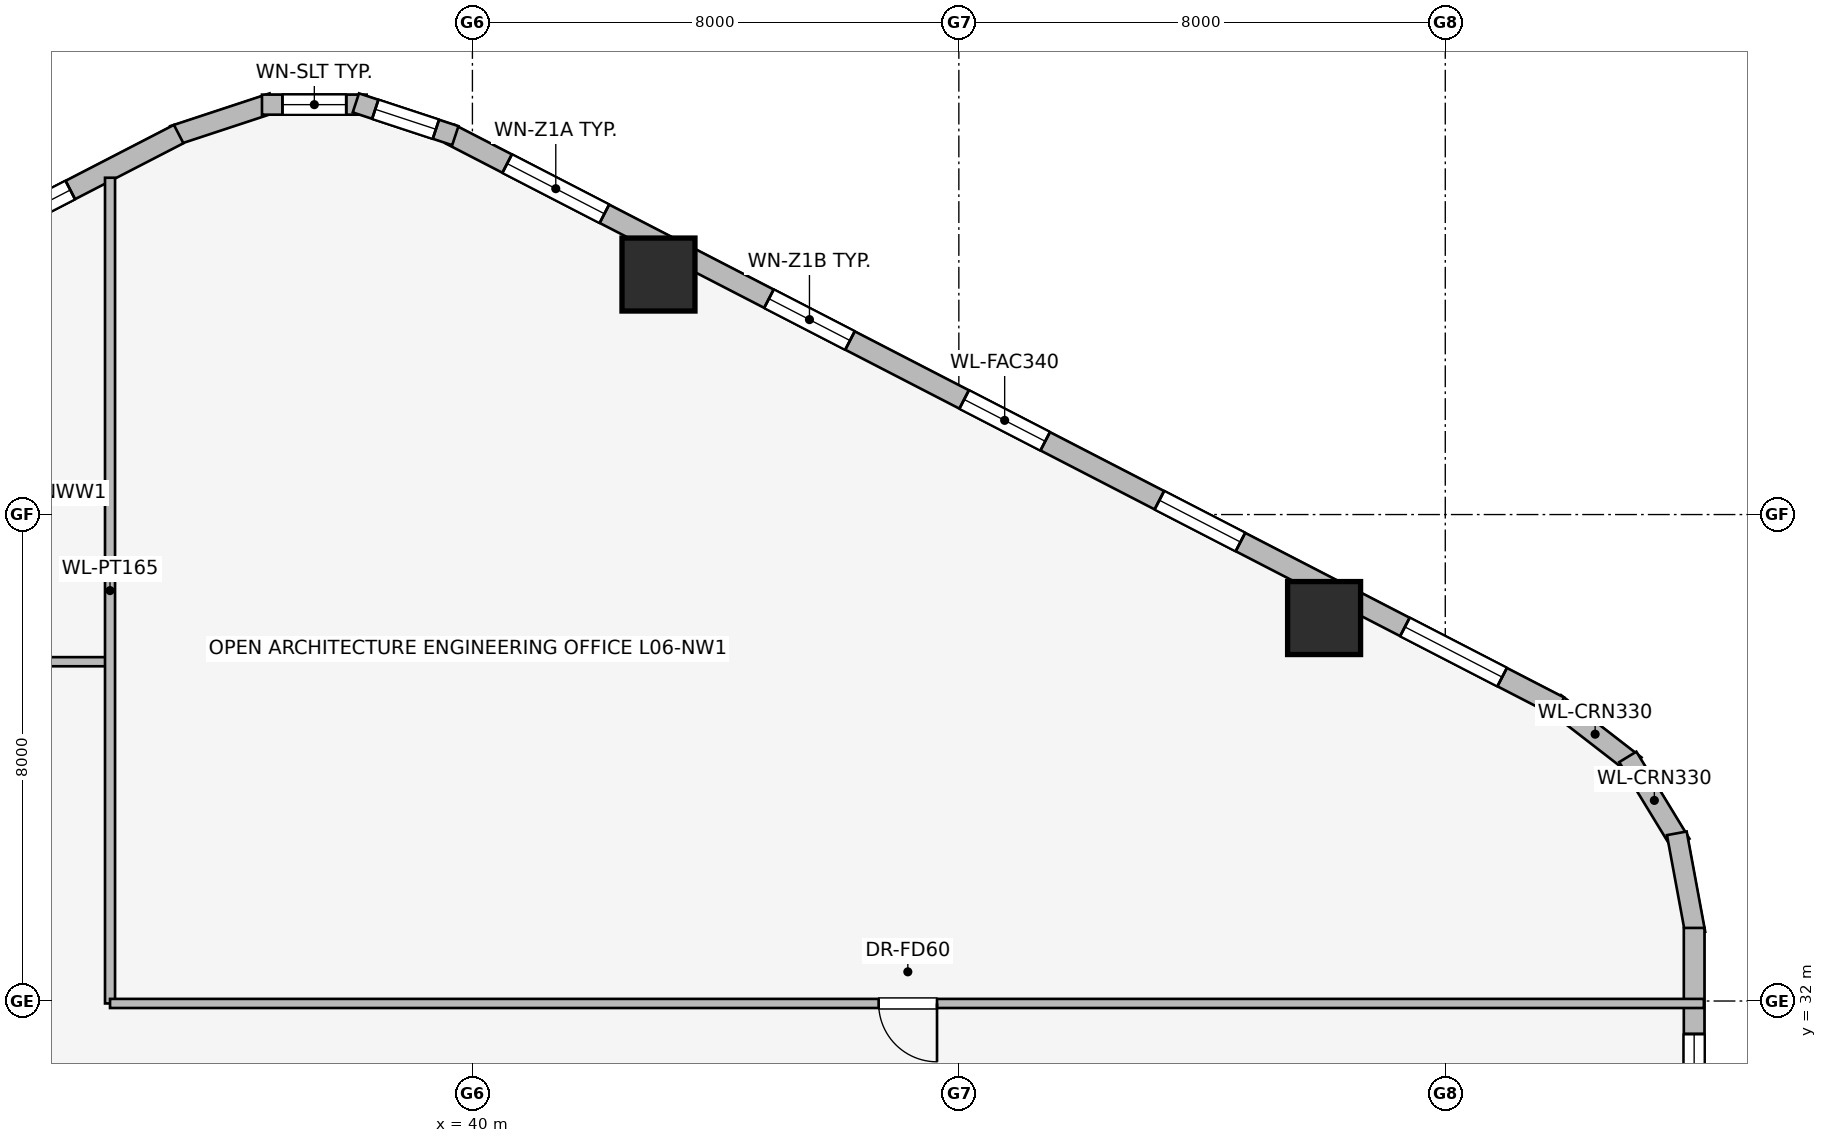
"""IFC4 building model, lengths in metres.
Left out: names, types, materials, properties, quantities, classifications, styles, units other than length and angle.
Written with IfcOpenShell. Run it as: python <this file> out.ifc"""

import sys

from ifc_helpers import new_model, si_unit, direction, frame, frame_2d, origin, origin_2d, place, context, subcontext, project, spatial, rectangle, hollow_rectangle, extrude, element, fill, save


model = new_model("IFC4")
c1 = context("Model", 3, precision=1e-05, world=origin(), true_north=direction((0.0, 1.0)))
c2 = subcontext(c1, "Body", "Model", "MODEL_VIEW")
j1 = project(units=[si_unit("LENGTHUNIT", "METRE"), si_unit("PLANEANGLEUNIT", "RADIAN")], contexts=[c1])
p1 = place(None, origin())
s1 = spatial("IfcSite", under=j1, at=p1, CompositionType="ELEMENT")
p2 = place(p1, origin())
s2 = spatial("IfcBuilding", under=s1, at=p2, CompositionType="ELEMENT")
p3 = place(p2, frame((0.0, 0.0, 21.0)))
s3 = spatial("IfcBuildingStorey", under=s2, at=p3, CompositionType="ELEMENT", Elevation=21.0)
for number, where, z_axis, x_axis in (
    (1, (36.0, 47.1, 5.55), (0.0, 0.0, 1.0), (1.0, 0.0, 0.0)),
    (2, (54.0, 47.1, 5.55), (0.0, 0.0, 1.0), (1.0, 0.0, 0.0)),
):
    element("IfcColumn", number, at=place(p3, frame(where, z_axis=z_axis, x_axis=x_axis)), inside=s3, PredefinedType="USERDEFINED", context=c2, shape_type="SweptSolid", body=[
        extrude(hollow_rectangle(XDim=0.4, YDim=0.4, WallThickness=0.022, at=origin_2d()), origin(), (0.0, 0.0, 1.0), 3.25),
    ])
p4 = place(p2, frame((0.0, 0.0, 27.0)))
s4 = spatial("IfcBuildingStorey", under=s2, at=p4, CompositionType="ELEMENT", Elevation=27.0)
for number, where, z_axis, x_axis in (
    (3, (54.007, 38.298, -0.42), (0.0, 0.0, 1.0), (1.0, 0.0, 0.0)),
    (4, (43.06, 43.947, -0.42), (0.0, 0.0, 1.0), (1.0, 0.0, 0.0)),
):
    element("IfcColumn", number, at=place(p4, frame(where, z_axis=z_axis, x_axis=x_axis)), inside=s4, PredefinedType="COLUMN", context=c2, shape_type="SweptSolid", body=[
        extrude(rectangle(XDim=1.2, YDim=1.2, at=origin_2d()), origin(), (0.0, 0.0, 1.0), 4.07),
    ])
p5 = place(p4, frame((57.802, 36.901, 0.0), z_axis=(0.0, 0.0, 1.0), x_axis=(0.790691856293, -0.61221433207, 0.0)))
e5 = element("IfcWall", 5, at=p5, inside=s4, PredefinedType="STANDARD", context=c2, shape_type="SweptSolid", body=[
    extrude(rectangle(XDim=1.676, YDim=0.33, at=frame_2d((0.838, 0.0))), origin(), (0.0, 0.0, 1.0), 3.39),
])
p6 = place(p4, frame((59.002, 36.015, 0.0), z_axis=(0.0, 0.0, 1.0), x_axis=(0.520584129191, -0.853810379671, 0.0)))
e6 = element("IfcWall", 6, at=p6, inside=s4, PredefinedType="STANDARD", context=c2, shape_type="SweptSolid", body=[
    extrude(rectangle(XDim=1.677, YDim=0.33, at=frame_2d((0.838, 0.0))), origin(), (0.0, 0.0, 1.0), 3.39),
])
p7 = place(p4, frame((59.808, 34.758, 0.0), z_axis=(0.0, 0.0, 1.0), x_axis=(0.181714143354, -0.983351397063, 0.0)))
e7 = element("IfcWall", 7, at=p7, inside=s4, PredefinedType="STANDARD", context=c2, shape_type="SweptSolid", body=[
    extrude(rectangle(XDim=1.678, YDim=0.33, at=frame_2d((0.839, 0.0))), origin(), (0.0, 0.0, 1.0), 3.39),
])
p8 = place(p4, frame((39.631, 46.257, 0.0), z_axis=(0.0, 0.0, 1.0), x_axis=(0.888634413993, -0.458616264721, 0.0)))
e8 = element("IfcWall", 8, at=p8, inside=s4, PredefinedType="STANDARD", context=c2, shape_type="SweptSolid", body=[
    extrude(rectangle(XDim=20.531, YDim=0.34, at=frame_2d((10.266, 0.0))), origin(), (0.0, 0.0, 1.0), 2.684),
])
p9 = place(p8, frame((1.058, 0.0, 0.75)))
e9 = element("IfcOpeningElement", 9, at=p9, cuts=e8, PredefinedType="OPENING", context=c2, shape_type="SweptSolid", body=[
    extrude(rectangle(XDim=1.8, YDim=1.5, at=frame_2d((0.9, 0.75))), frame((0.0, 0.18, 0.0), z_axis=(0.0, -1.0, 0.0), x_axis=(1.0, 0.0, 0.0)), (0.0, 0.0, 1.0), 0.36),
])
p10 = place(p8, frame((5.903, 0.0, 0.75)))
e10 = element("IfcOpeningElement", 10, at=p10, cuts=e8, PredefinedType="OPENING", context=c2, shape_type="SweptSolid", body=[
    extrude(rectangle(XDim=1.5, YDim=1.5, at=frame_2d((0.75, 0.75))), frame((0.0, 0.18, 0.0), z_axis=(0.0, -1.0, 0.0), x_axis=(1.0, 0.0, 0.0)), (0.0, 0.0, 1.0), 0.36),
])
p11 = place(p8, frame((9.516, 0.0, 0.75)))
e11 = element("IfcOpeningElement", 11, at=p11, cuts=e8, PredefinedType="OPENING", context=c2, shape_type="SweptSolid", body=[
    extrude(rectangle(XDim=1.5, YDim=1.5, at=frame_2d((0.75, 0.75))), frame((0.0, 0.18, 0.0), z_axis=(0.0, -1.0, 0.0), x_axis=(1.0, 0.0, 0.0)), (0.0, 0.0, 1.0), 0.36),
])
p12 = place(p8, frame((13.129, 0.0, 0.75)))
e12 = element("IfcOpeningElement", 12, at=p12, cuts=e8, PredefinedType="OPENING", context=c2, shape_type="SweptSolid", body=[
    extrude(rectangle(XDim=1.5, YDim=1.5, at=frame_2d((0.75, 0.75))), frame((0.0, 0.18, 0.0), z_axis=(0.0, -1.0, 0.0), x_axis=(1.0, 0.0, 0.0)), (0.0, 0.0, 1.0), 0.36),
])
p13 = place(p8, frame((17.673, 0.0, 0.75)))
e13 = element("IfcOpeningElement", 13, at=p13, cuts=e8, PredefinedType="OPENING", context=c2, shape_type="SweptSolid", body=[
    extrude(rectangle(XDim=1.8, YDim=1.5, at=frame_2d((0.9, 0.75))), frame((0.0, 0.18, 0.0), z_axis=(0.0, -1.0, 0.0), x_axis=(1.0, 0.0, 0.0)), (0.0, 0.0, 1.0), 0.36),
])
p14 = place(p4, frame((35.081, 46.231, 0.0), z_axis=(0.0, 0.0, 1.0), x_axis=(0.94976901097, 0.312951794691, 0.0)))
e14 = element("IfcWall", 14, at=p14, inside=s4, PredefinedType="STANDARD", context=c2, shape_type="SweptSolid", body=[
    extrude(rectangle(XDim=1.722, YDim=0.33, at=frame_2d((0.861, 0.0))), origin(), (0.0, 0.0, 1.0), 3.39),
])
p15 = place(p4, frame((36.539, 46.741, 0.0), z_axis=(0.0, 0.0, 1.0), x_axis=(1.0, 0.0, 0.0)))
e15 = element("IfcWall", 15, at=p15, inside=s4, PredefinedType="STANDARD", context=c2, shape_type="SweptSolid", body=[
    extrude(rectangle(XDim=1.722, YDim=0.33, at=frame_2d((0.861, 0.0))), origin(), (0.0, 0.0, 1.0), 3.39),
])
p16 = place(p15, frame((0.336, 0.0, 0.75)))
e16 = element("IfcOpeningElement", 16, at=p16, cuts=e15, PredefinedType="OPENING", context=c2, shape_type="SweptSolid", body=[
    extrude(rectangle(XDim=1.05, YDim=1.4, at=frame_2d((0.525, 0.7))), frame((0.0, 0.175, 0.0), z_axis=(0.0, -1.0, 0.0), x_axis=(1.0, 0.0, 0.0)), (0.0, 0.0, 1.0), 0.35),
])
p17 = place(p4, frame((38.083, 46.77, 0.0), z_axis=(0.0, 0.0, 1.0), x_axis=(0.94976901097, -0.312951794691, 0.0)))
e17 = element("IfcWall", 17, at=p17, inside=s4, PredefinedType="STANDARD", context=c2, shape_type="SweptSolid", body=[
    extrude(rectangle(XDim=1.722, YDim=0.33, at=frame_2d((0.861, 0.0))), origin(), (0.0, 0.0, 1.0), 3.39),
])
p18 = place(p17, frame((0.336, 0.0, 0.75)))
e18 = element("IfcOpeningElement", 18, at=p18, cuts=e17, PredefinedType="OPENING", context=c2, shape_type="SweptSolid", body=[
    extrude(rectangle(XDim=1.05, YDim=1.4, at=frame_2d((0.525, 0.7))), frame((0.0, 0.175, 0.0), z_axis=(0.0, -1.0, 0.0), x_axis=(1.0, 0.0, 0.0)), (0.0, 0.0, 1.0), 0.35),
])
p19 = place(p4, frame((16.924, 36.841, 0.0), z_axis=(0.0, 0.0, 1.0), x_axis=(0.888634413993, 0.458616264721, 0.0)))
e19 = element("IfcWall", 19, at=p19, inside=s4, PredefinedType="STANDARD", context=c2, shape_type="SweptSolid", body=[
    extrude(rectangle(XDim=20.531, YDim=0.34, at=frame_2d((10.266, 0.0))), origin(), (0.0, 0.0, 1.0), 2.684),
])
p20 = place(p19, frame((2.161, 0.0, 0.75)))
e20 = element("IfcOpeningElement", 20, at=p20, cuts=e19, PredefinedType="OPENING", context=c2, shape_type="SweptSolid", body=[
    extrude(rectangle(XDim=1.05, YDim=1.4, at=frame_2d((0.525, 0.7))), frame((0.0, 0.18, 0.0), z_axis=(0.0, -1.0, 0.0), x_axis=(1.0, 0.0, 0.0)), (0.0, 0.0, 1.0), 0.36),
])
p21 = place(p19, frame((5.903, 0.0, 0.75)))
e21 = element("IfcOpeningElement", 21, at=p21, cuts=e19, PredefinedType="OPENING", context=c2, shape_type="SweptSolid", body=[
    extrude(rectangle(XDim=1.5, YDim=1.5, at=frame_2d((0.75, 0.75))), frame((0.0, 0.18, 0.0), z_axis=(0.0, -1.0, 0.0), x_axis=(1.0, 0.0, 0.0)), (0.0, 0.0, 1.0), 0.36),
])
p22 = place(p19, frame((9.516, 0.0, 0.75)))
e22 = element("IfcOpeningElement", 22, at=p22, cuts=e19, PredefinedType="OPENING", context=c2, shape_type="SweptSolid", body=[
    extrude(rectangle(XDim=1.5, YDim=1.5, at=frame_2d((0.75, 0.75))), frame((0.0, 0.18, 0.0), z_axis=(0.0, -1.0, 0.0), x_axis=(1.0, 0.0, 0.0)), (0.0, 0.0, 1.0), 0.36),
])
p23 = place(p19, frame((13.129, 0.0, 0.75)))
e23 = element("IfcOpeningElement", 23, at=p23, cuts=e19, PredefinedType="OPENING", context=c2, shape_type="SweptSolid", body=[
    extrude(rectangle(XDim=1.5, YDim=1.5, at=frame_2d((0.75, 0.75))), frame((0.0, 0.18, 0.0), z_axis=(0.0, -1.0, 0.0), x_axis=(1.0, 0.0, 0.0)), (0.0, 0.0, 1.0), 0.36),
])
p24 = place(p19, frame((17.476, 0.0, 0.75)))
e24 = element("IfcOpeningElement", 24, at=p24, cuts=e19, PredefinedType="OPENING", context=c2, shape_type="SweptSolid", body=[
    extrude(rectangle(XDim=1.05, YDim=1.4, at=frame_2d((0.525, 0.7))), frame((0.0, 0.18, 0.0), z_axis=(0.0, -1.0, 0.0), x_axis=(1.0, 0.0, 0.0)), (0.0, 0.0, 1.0), 0.36),
])
p25 = place(p4, frame((60.093, 33.202, 0.0), z_axis=(0.0, 0.0, 1.0), x_axis=(0.0, -1.0, 0.0)))
e25 = element("IfcWall", 25, at=p25, inside=s4, PredefinedType="STANDARD", context=c2, shape_type="SweptSolid", body=[
    extrude(rectangle(XDim=18.404, YDim=0.34, at=frame_2d((9.202, 0.0))), origin(), (0.0, 0.0, 1.0), 2.684),
])
p26 = place(p25, frame((1.744, 0.0, 0.75)))
e26 = element("IfcOpeningElement", 26, at=p26, cuts=e25, PredefinedType="OPENING", context=c2, shape_type="SweptSolid", body=[
    extrude(rectangle(XDim=1.05, YDim=1.4, at=frame_2d((0.525, 0.7))), frame((0.0, 0.18, 0.0), z_axis=(0.0, -1.0, 0.0), x_axis=(1.0, 0.0, 0.0)), (0.0, 0.0, 1.0), 0.36),
])
p27 = place(p25, frame((5.265, 0.0, 0.75)))
e27 = element("IfcOpeningElement", 27, at=p27, cuts=e25, PredefinedType="OPENING", context=c2, shape_type="SweptSolid", body=[
    extrude(rectangle(XDim=1.5, YDim=1.5, at=frame_2d((0.75, 0.75))), frame((0.0, 0.18, 0.0), z_axis=(0.0, -1.0, 0.0), x_axis=(1.0, 0.0, 0.0)), (0.0, 0.0, 1.0), 0.36),
])
p28 = place(p25, frame((8.452, 0.0, 0.75)))
e28 = element("IfcOpeningElement", 28, at=p28, cuts=e25, PredefinedType="OPENING", context=c2, shape_type="SweptSolid", body=[
    extrude(rectangle(XDim=1.5, YDim=1.5, at=frame_2d((0.75, 0.75))), frame((0.0, 0.18, 0.0), z_axis=(0.0, -1.0, 0.0), x_axis=(1.0, 0.0, 0.0)), (0.0, 0.0, 1.0), 0.36),
])
p29 = place(p25, frame((11.639, 0.0, 0.75)))
e29 = element("IfcOpeningElement", 29, at=p29, cuts=e25, PredefinedType="OPENING", context=c2, shape_type="SweptSolid", body=[
    extrude(rectangle(XDim=1.5, YDim=1.5, at=frame_2d((0.75, 0.75))), frame((0.0, 0.18, 0.0), z_axis=(0.0, -1.0, 0.0), x_axis=(1.0, 0.0, 0.0)), (0.0, 0.0, 1.0), 0.36),
])
p30 = place(p25, frame((15.65, 0.0, 0.75)))
e30 = element("IfcOpeningElement", 30, at=p30, cuts=e25, PredefinedType="OPENING", context=c2, shape_type="SweptSolid", body=[
    extrude(rectangle(XDim=1.05, YDim=1.4, at=frame_2d((0.525, 0.7))), frame((0.0, 0.18, 0.0), z_axis=(0.0, -1.0, 0.0), x_axis=(1.0, 0.0, 0.0)), (0.0, 0.0, 1.0), 0.36),
])
p31 = place(p4, frame((34.0, 37.58, 0.0), z_axis=(0.0, 0.0, 1.0), x_axis=(-1.0, 0.0, 0.0)))
e31 = element("IfcWall", 31, at=p31, inside=s4, PredefinedType="PARTITIONING", context=c2, shape_type="SweptSolid", body=[
    extrude(rectangle(XDim=15.6, YDim=0.15, at=frame_2d((7.8, 0.0))), origin(), (0.0, 0.0, 1.0), 3.39),
])
p32 = place(p31, frame((5.195, 0.0, 0.0)))
e32 = element("IfcOpeningElement", 32, at=p32, cuts=e31, PredefinedType="OPENING", context=c2, shape_type="SweptSolid", body=[
    extrude(rectangle(XDim=0.96, YDim=2.0, at=frame_2d((0.48, 1.0))), frame((0.0, 0.085, 0.0), z_axis=(0.0, -1.0, 0.0), x_axis=(1.0, 0.0, 0.0)), (0.0, 0.0, 1.0), 0.17),
])
p33 = place(p4, frame((34.04, 31.96, 0.0), z_axis=(0.0, 0.0, 1.0), x_axis=(0.0, 1.0, 0.0)))
e33 = element("IfcWall", 33, at=p33, inside=s4, PredefinedType="PARTITIONING", context=c2, shape_type="SweptSolid", body=[
    extrude(rectangle(XDim=13.579, YDim=0.165, at=frame_2d((6.79, 0.0))), origin(), (0.0, 0.0, 1.0), 3.39),
])
p34 = place(p4, frame((60.253, 31.96, 0.0), z_axis=(0.0, 0.0, 1.0), x_axis=(-1.0, 0.0, 0.0)))
e34 = element("IfcWall", 34, at=p34, inside=s4, PredefinedType="PARTITIONING", context=c2, shape_type="SweptSolid", body=[
    extrude(rectangle(XDim=26.213, YDim=0.15, at=frame_2d((13.106, 0.0))), origin(), (0.0, 0.0, 1.0), 3.39),
])
p35 = place(p34, frame((12.612, 0.0, 0.0)))
e35 = element("IfcOpeningElement", 35, at=p35, cuts=e34, PredefinedType="OPENING", context=c2, shape_type="SweptSolid", body=[
    extrude(rectangle(XDim=0.96, YDim=2.0, at=frame_2d((0.48, 1.0))), frame((0.0, 0.085, 0.0), z_axis=(0.0, -1.0, 0.0), x_axis=(1.0, 0.0, 0.0)), (0.0, 0.0, 1.0), 0.17),
])
p36 = place(p9, origin())
e36 = element("IfcWindow", 36, at=p36, inside=s4, PartitioningType="SINGLE_PANEL", PredefinedType="WINDOW", context=c2, shape_type="SweptSolid", body=[
    extrude(rectangle(XDim=1.8, YDim=1.5, at=frame_2d((0.9, 0.75))), frame((0.0, 0.03, 0.0), z_axis=(0.0, -1.0, 0.0), x_axis=(1.0, 0.0, 0.0)), (0.0, 0.0, 1.0), 0.06),
])
fill(e9, e36)
p37 = place(p10, origin())
e37 = element("IfcWindow", 37, at=p37, inside=s4, PartitioningType="SINGLE_PANEL", PredefinedType="WINDOW", context=c2, shape_type="SweptSolid", body=[
    extrude(rectangle(XDim=1.5, YDim=1.5, at=frame_2d((0.75, 0.75))), frame((0.0, 0.03, 0.0), z_axis=(0.0, -1.0, 0.0), x_axis=(1.0, 0.0, 0.0)), (0.0, 0.0, 1.0), 0.06),
])
fill(e10, e37)
p38 = place(p11, origin())
e38 = element("IfcWindow", 38, at=p38, inside=s4, PartitioningType="SINGLE_PANEL", PredefinedType="WINDOW", context=c2, shape_type="SweptSolid", body=[
    extrude(rectangle(XDim=1.5, YDim=1.5, at=frame_2d((0.75, 0.75))), frame((0.0, 0.03, 0.0), z_axis=(0.0, -1.0, 0.0), x_axis=(1.0, 0.0, 0.0)), (0.0, 0.0, 1.0), 0.06),
])
fill(e11, e38)
p39 = place(p12, origin())
e39 = element("IfcWindow", 39, at=p39, inside=s4, PartitioningType="SINGLE_PANEL", PredefinedType="WINDOW", context=c2, shape_type="SweptSolid", body=[
    extrude(rectangle(XDim=1.5, YDim=1.5, at=frame_2d((0.75, 0.75))), frame((0.0, 0.03, 0.0), z_axis=(0.0, -1.0, 0.0), x_axis=(1.0, 0.0, 0.0)), (0.0, 0.0, 1.0), 0.06),
])
fill(e12, e39)
p40 = place(p13, origin())
e40 = element("IfcWindow", 40, at=p40, inside=s4, PartitioningType="SINGLE_PANEL", PredefinedType="WINDOW", context=c2, shape_type="SweptSolid", body=[
    extrude(rectangle(XDim=1.8, YDim=1.5, at=frame_2d((0.9, 0.75))), frame((0.0, 0.03, 0.0), z_axis=(0.0, -1.0, 0.0), x_axis=(1.0, 0.0, 0.0)), (0.0, 0.0, 1.0), 0.06),
])
fill(e13, e40)
p41 = place(p16, origin())
e41 = element("IfcWindow", 41, at=p41, inside=s4, PartitioningType="SINGLE_PANEL", PredefinedType="WINDOW", context=c2, shape_type="SweptSolid", body=[
    extrude(rectangle(XDim=1.05, YDim=1.4, at=frame_2d((0.525, 0.7))), frame((0.0, 0.03, 0.0), z_axis=(0.0, -1.0, 0.0), x_axis=(1.0, 0.0, 0.0)), (0.0, 0.0, 1.0), 0.06),
])
fill(e16, e41)
p42 = place(p18, origin())
e42 = element("IfcWindow", 42, at=p42, inside=s4, PartitioningType="SINGLE_PANEL", PredefinedType="WINDOW", context=c2, shape_type="SweptSolid", body=[
    extrude(rectangle(XDim=1.05, YDim=1.4, at=frame_2d((0.525, 0.7))), frame((0.0, 0.03, 0.0), z_axis=(0.0, -1.0, 0.0), x_axis=(1.0, 0.0, 0.0)), (0.0, 0.0, 1.0), 0.06),
])
fill(e18, e42)
p43 = place(p24, origin())
e43 = element("IfcWindow", 43, at=p43, inside=s4, PartitioningType="SINGLE_PANEL", PredefinedType="WINDOW", context=c2, shape_type="SweptSolid", body=[
    extrude(rectangle(XDim=1.05, YDim=1.4, at=frame_2d((0.525, 0.7))), frame((0.0, 0.03, 0.0), z_axis=(0.0, -1.0, 0.0), x_axis=(1.0, 0.0, 0.0)), (0.0, 0.0, 1.0), 0.06),
])
fill(e24, e43)
p44 = place(p26, origin())
e44 = element("IfcWindow", 44, at=p44, inside=s4, PartitioningType="SINGLE_PANEL", PredefinedType="WINDOW", context=c2, shape_type="SweptSolid", body=[
    extrude(rectangle(XDim=1.05, YDim=1.4, at=frame_2d((0.525, 0.7))), frame((0.0, 0.03, 0.0), z_axis=(0.0, -1.0, 0.0), x_axis=(1.0, 0.0, 0.0)), (0.0, 0.0, 1.0), 0.06),
])
fill(e26, e44)
p45 = place(p35, origin())
e45 = element("IfcDoor", 45, at=p45, inside=s4, OperationType="SINGLE_SWING_LEFT", PredefinedType="DOOR", context=c2, shape_type="SweptSolid", body=[
    extrude(rectangle(XDim=0.96, YDim=2.0, at=frame_2d((0.48, 1.0))), frame((0.0, 0.025, 0.0), z_axis=(0.0, -1.0, 0.0), x_axis=(1.0, 0.0, 0.0)), (0.0, 0.0, 1.0), 0.05),
])
fill(e35, e45)
save(model, sys.argv[1])
